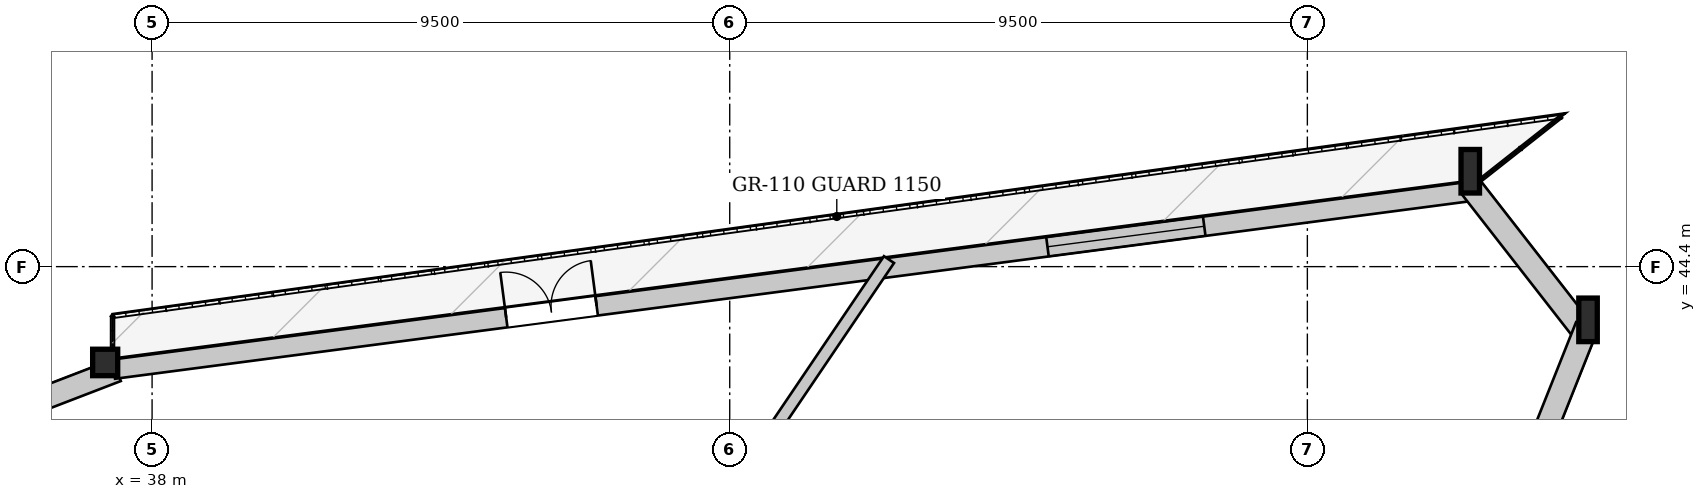
"""IFC4 building model, lengths in metres.
Left out: names, types, materials, properties, quantities, classifications, styles, units other than length and angle.
Written with IfcOpenShell. Run it as: python <this file> out.ifc"""

import sys

from ifc_helpers import new_model, si_unit, direction, frame, frame_2d, origin, origin_2d, place, context, subcontext, project, spatial, rectangle, i_section, extrude, source, transform, mapped, element, fill, save


model = new_model("IFC4")
c1 = context("Model", 3, precision=1e-05, world=origin(), true_north=direction((0.0, 1.0)))
c2 = subcontext(c1, "Body", "Model", "MODEL_VIEW")
j1 = project(units=[si_unit("LENGTHUNIT", "METRE"), si_unit("PLANEANGLEUNIT", "RADIAN")], contexts=[c1])
p1 = place(None, origin())
s1 = spatial("IfcSite", under=j1, at=p1, CompositionType="ELEMENT")
p2 = place(p1, origin())
s2 = spatial("IfcBuilding", under=s1, at=p2, CompositionType="ELEMENT")
p3 = place(p2, frame((0.0, 0.0, 189.2)))
s3 = spatial("IfcBuildingStorey", under=s2, at=p3, CompositionType="ELEMENT", Elevation=189.2)
m1 = source(origin(), c2, "Body", "SweptSolid", [
    extrude(i_section(OverallWidth=0.304, OverallDepth=0.716, WebThickness=0.021, FlangeThickness=0.04, at=origin_2d()), origin(), (0.0, 0.0, 1.0), 3.418),
])
p4 = place(p3, frame((61.772, 43.346, 0.0), z_axis=(-0.091350364073, 0.10484936236, 0.990283657442), x_axis=(-0.75397491374, -0.656903211631, 0.0)))
e1 = element("IfcColumn", 1, at=p4, inside=s3, PredefinedType="COLUMN", context=c2, shape_type="MappedRepresentation", body=[
    mapped(m1, transform((0.0, 0.0, 0.0), x_axis=(1.0, 0.0, 0.0), y_axis=(0.0, 1.0, 0.0), z_axis=(0.0, 0.0, 1.0), scale=1.0)),
])
m2 = source(origin(), c2, "Body", "SweptSolid", [
    extrude(i_section(OverallWidth=0.304, OverallDepth=0.716, WebThickness=0.021, FlangeThickness=0.04, at=origin_2d()), origin(), (0.0, 0.0, 1.0), 3.414),
])
p5 = place(p3, frame((59.843, 45.82, 0.0), z_axis=(-0.095689436371, 0.087250457677, 0.991579996471), x_axis=(-0.673771596973, -0.738939669467, 0.0)))
e2 = element("IfcColumn", 2, at=p5, inside=s3, PredefinedType="COLUMN", context=c2, shape_type="MappedRepresentation", body=[
    mapped(m2, transform((0.0, 0.0, 0.0), x_axis=(1.0, 0.0, 0.0), y_axis=(0.0, 1.0, 0.0), z_axis=(0.0, 0.0, 1.0), scale=1.0)),
])
m3 = source(origin(), c2, "Body", "SweptSolid", [
    extrude(i_section(OverallWidth=0.412, OverallDepth=0.435, WebThickness=0.031, FlangeThickness=0.05, at=origin_2d()), origin(), (0.0, 0.0, 1.0), 3.395),
])
p6 = place(p3, frame((37.349, 42.873, 0.0), z_axis=(-0.071192017009, -0.028764451317, 0.997047793767), x_axis=(0.374617894384, -0.927179288599, 0.0)))
e3 = element("IfcColumn", 3, at=p6, inside=s3, PredefinedType="COLUMN", context=c2, shape_type="MappedRepresentation", body=[
    mapped(m3, transform((0.0, 0.0, 0.0), x_axis=(1.0, 0.0, 0.0), y_axis=(0.0, 1.0, 0.0), z_axis=(0.0, 0.0, 1.0), scale=1.0)),
])
p7 = place(p3, frame((16.245, 34.55, 0.0), z_axis=(0.0, 0.0, 1.0), x_axis=(0.933308155782, 0.359076435249, 0.0)))
e4 = element("IfcWall", 4, at=p7, inside=s3, PredefinedType="SOLIDWALL", context=c2, shape_type="SweptSolid", body=[
    extrude(rectangle(XDim=22.685, YDim=0.38, at=frame_2d((11.343, 0.0))), origin(), (0.0, 0.0, 1.0), 2.722),
])
p8 = place(p7, frame((5.752, 0.0, 0.65)))
e5 = element("IfcOpeningElement", 5, at=p8, cuts=e4, PredefinedType="OPENING", context=c2, shape_type="SweptSolid", body=[
    extrude(rectangle(XDim=1.2, YDim=1.5, at=frame_2d((0.6, 0.75))), frame((0.0, 0.2, 0.0), z_axis=(0.0, -1.0, 0.0), x_axis=(1.0, 0.0, 0.0)), (0.0, 0.0, 1.0), 0.4),
])
p9 = place(p7, frame((15.733, 0.0, 0.65)))
e6 = element("IfcOpeningElement", 6, at=p9, cuts=e4, PredefinedType="OPENING", context=c2, shape_type="SweptSolid", body=[
    extrude(rectangle(XDim=1.2, YDim=1.5, at=frame_2d((0.6, 0.75))), frame((0.0, 0.2, 0.0), z_axis=(0.0, -1.0, 0.0), x_axis=(1.0, 0.0, 0.0)), (0.0, 0.0, 1.0), 0.4),
])
p10 = place(p3, frame((37.37, 42.715, 0.0), z_axis=(0.0, 0.0, 1.0), x_axis=(0.991528786197, 0.129887128474, 0.0)))
e7 = element("IfcWall", 7, at=p10, inside=s3, PredefinedType="SOLIDWALL", context=c2, shape_type="SweptSolid", body=[
    extrude(rectangle(XDim=22.685, YDim=0.32, at=frame_2d((11.343, 0.0))), origin(), (0.0, 0.0, 1.0), 2.722),
])
p11 = place(p10, frame((6.509, 0.0, 0.0)))
e8 = element("IfcOpeningElement", 8, at=p11, cuts=e7, PredefinedType="OPENING", context=c2, shape_type="SweptSolid", body=[
    extrude(rectangle(XDim=1.5, YDim=2.3, at=frame_2d((0.75, 1.15))), frame((0.0, 0.17, 0.0), z_axis=(0.0, -1.0, 0.0), x_axis=(1.0, 0.0, 0.0)), (0.0, 0.0, 1.0), 0.34),
])
p12 = place(p10, frame((15.487, 0.0, 0.252)))
e9 = element("IfcOpeningElement", 9, at=p12, cuts=e7, PredefinedType="OPENING", context=c2, shape_type="SweptSolid", body=[
    extrude(rectangle(XDim=2.6, YDim=2.35, at=frame_2d((1.3, 1.175))), frame((0.0, 0.17, 0.0), z_axis=(0.0, -1.0, 0.0), x_axis=(1.0, 0.0, 0.0)), (0.0, 0.0, 1.0), 0.34),
])
p13 = place(p3, frame((59.693, 45.703, 0.0), z_axis=(0.0, 0.0, 1.0), x_axis=(0.615044377404, -0.788492494463, 0.0)))
e10 = element("IfcWall", 10, at=p13, inside=s3, PredefinedType="SOLIDWALL", context=c2, shape_type="SweptSolid", body=[
    extrude(rectangle(XDim=3.137, YDim=0.38, at=frame_2d((1.569, 0.0))), origin(), (0.0, 0.0, 1.0), 2.722),
])
p14 = place(p3, frame((61.596, 43.416, 0.0), z_axis=(0.0, 0.0, 1.0), x_axis=(-0.370190270335, -0.928955953611, 0.0)))
e11 = element("IfcWall", 11, at=p14, inside=s3, PredefinedType="SOLIDWALL", context=c2, shape_type="SweptSolid", body=[
    extrude(rectangle(XDim=23.255, YDim=0.38, at=frame_2d((11.627, 0.0))), origin(), (0.0, 0.0, 1.0), 2.722),
])
p15 = place(p14, frame((5.911, 0.0, 0.65)))
e12 = element("IfcOpeningElement", 12, at=p15, cuts=e11, PredefinedType="OPENING", context=c2, shape_type="SweptSolid", body=[
    extrude(rectangle(XDim=1.2, YDim=1.5, at=frame_2d((0.6, 0.75))), frame((0.0, 0.2, 0.0), z_axis=(0.0, -1.0, 0.0), x_axis=(1.0, 0.0, 0.0)), (0.0, 0.0, 1.0), 0.4),
])
p16 = place(p14, frame((16.143, 0.0, 0.65)))
e13 = element("IfcOpeningElement", 13, at=p16, cuts=e11, PredefinedType="OPENING", context=c2, shape_type="SweptSolid", body=[
    extrude(rectangle(XDim=1.2, YDim=1.5, at=frame_2d((0.6, 0.75))), frame((0.0, 0.2, 0.0), z_axis=(0.0, -1.0, 0.0), x_axis=(1.0, 0.0, 0.0)), (0.0, 0.0, 1.0), 0.4),
])
p17 = place(p3, frame((44.494, 36.2, 0.0), z_axis=(0.0, 0.0, 1.0), x_axis=(0.560293666023, 0.828294034637, 0.0)))
e14 = element("IfcWall", 14, at=p17, inside=s3, PredefinedType="PARTITIONING", context=c2, shape_type="SweptSolid", body=[
    extrude(rectangle(XDim=10.04, YDim=0.2, at=frame_2d((5.02, 0.0))), origin(), (0.0, 0.0, 1.0), 3.33),
])
m4 = source(origin(), c2, "Body", "SweptSolid", [
    extrude(rectangle(XDim=1.5, YDim=2.3, at=frame_2d((0.75, 1.15))), frame((0.0, 0.025, 0.0), z_axis=(0.0, -1.0, 0.0), x_axis=(1.0, 0.0, 0.0)), (0.0, 0.0, 1.0), 0.05),
])
p18 = place(p11, origin())
e15 = element("IfcDoor", 15, at=p18, inside=s3, OperationType="DOUBLE_DOOR_SINGLE_SWING", PredefinedType="DOOR", context=c2, shape_type="MappedRepresentation", body=[
    mapped(m4, transform((0.0, 0.0, 0.0), x_axis=(1.0, 0.0, 0.0), y_axis=(0.0, 1.0, 0.0), z_axis=(0.0, 0.0, 1.0), scale=1.0)),
])
fill(e8, e15)
m5 = source(origin(), c2, "Body", "SweptSolid", [
    extrude(rectangle(XDim=2.6, YDim=2.35, at=frame_2d((1.3, 1.175))), frame((0.0, 0.03, 0.0), z_axis=(0.0, -1.0, 0.0), x_axis=(1.0, 0.0, 0.0)), (0.0, 0.0, 1.0), 0.06),
])
p19 = place(p12, origin())
e16 = element("IfcWindow", 16, at=p19, inside=s3, PartitioningType="SINGLE_PANEL", PredefinedType="WINDOW", context=c2, shape_type="MappedRepresentation", body=[
    mapped(m5, transform((0.0, 0.0, 0.0), x_axis=(1.0, 0.0, 0.0), y_axis=(0.0, 1.0, 0.0), z_axis=(0.0, 0.0, 1.0), scale=1.0)),
])
fill(e9, e16)
save(model, sys.argv[1])
